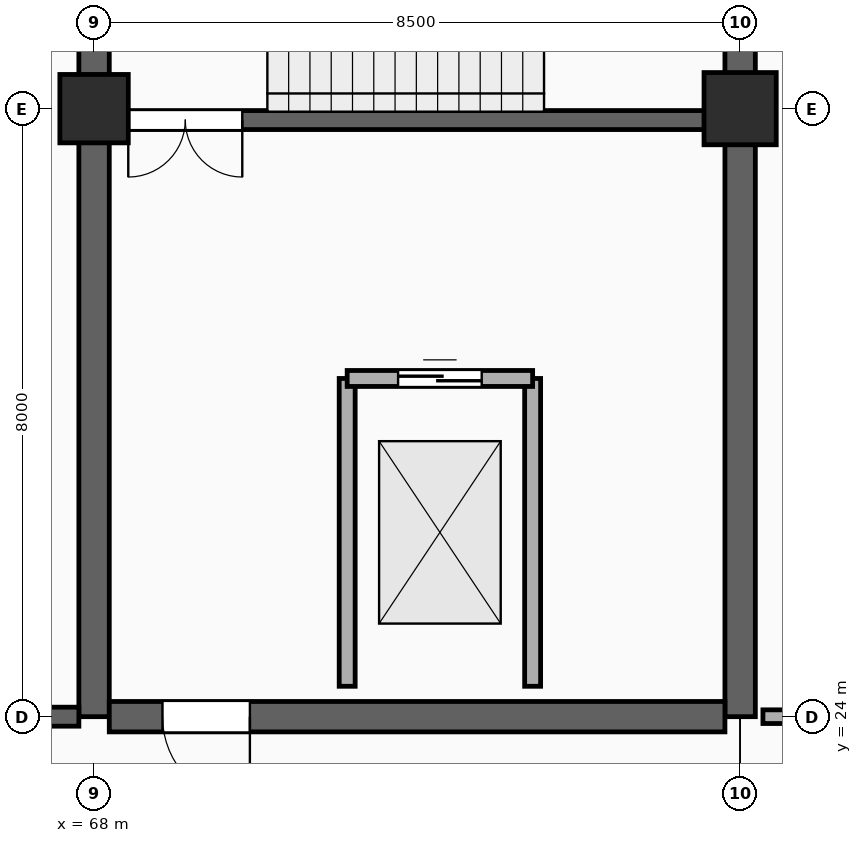
"""IFC4 building model, lengths in metres.
Left out: names, types, materials, properties, quantities, classifications, styles, units other than length and angle.
Written with IfcOpenShell. Run it as: python <this file> out.ifc"""

import sys

from ifc_helpers import new_model, si_unit, direction, frame, frame_2d, origin, origin_2d, place, context, subcontext, project, spatial, rectangle, extrude, element, fill, save


model = new_model("IFC4")
c1 = context("Model", 3, precision=1e-05, world=origin(), true_north=direction((0.0, 1.0)))
c2 = subcontext(c1, "Body", "Model", "MODEL_VIEW")
j1 = project(units=[si_unit("LENGTHUNIT", "METRE"), si_unit("PLANEANGLEUNIT", "RADIAN")], contexts=[c1])
p1 = place(None, origin())
s1 = spatial("IfcSite", under=j1, at=p1, CompositionType="ELEMENT")
p2 = place(p1, origin())
s2 = spatial("IfcBuilding", under=s1, at=p2, CompositionType="ELEMENT")
p3 = place(p2, frame((0.0, 0.0, -4.8)))
s3 = spatial("IfcBuildingStorey", under=s2, at=p3, CompositionType="ELEMENT", Elevation=-4.8)
for number, where, z_axis, x_axis in (
    (1, (68.0, 24.0, 0.0), (0.0, 0.0, 1.0), (0.0, 1.0, 0.0)),
    (2, (76.5, 24.0, 0.0), (0.0, 0.0, 1.0), (0.0, 1.0, 0.0)),
):
    element("IfcWall", number, at=place(p3, frame(where, z_axis=z_axis, x_axis=x_axis)), inside=s3, PredefinedType="SHEAR", context=c2, shape_type="SweptSolid", body=[
        extrude(rectangle(XDim=12.8, YDim=0.4, at=frame_2d((6.4, 0.0))), origin(), (0.0, 0.0, 1.0), 4.64),
    ])
p4 = place(p3, frame((68.2, 24.0, 0.0), z_axis=(0.0, 0.0, 1.0), x_axis=(1.0, 0.0, 0.0)))
e3 = element("IfcWall", 3, at=p4, inside=s3, PredefinedType="SHEAR", context=c2, shape_type="SweptSolid", body=[
    extrude(rectangle(XDim=8.1, YDim=0.4, at=frame_2d((4.05, 0.0))), origin(), (0.0, 0.0, 1.0), 4.64),
])
p5 = place(p4, frame((0.7, 0.0, 0.0)))
e4 = element("IfcOpeningElement", 4, at=p5, cuts=e3, PredefinedType="OPENING", context=c2, shape_type="SweptSolid", body=[
    extrude(rectangle(XDim=1.15, YDim=2.2, at=frame_2d((0.575, 1.1))), frame((0.0, 0.212, 0.0), z_axis=(0.0, -1.0, 0.0), x_axis=(1.0, 0.0, 0.0)), (0.0, 0.0, 1.0), 0.424),
])
p6 = place(p3, frame((68.25, 31.85, 0.0), z_axis=(0.0, 0.0, 1.0), x_axis=(1.0, 0.0, 0.0)))
e5 = element("IfcWall", 5, at=p6, inside=s3, PredefinedType="STANDARD", context=c2, shape_type="SweptSolid", body=[
    extrude(rectangle(XDim=8.0, YDim=0.25, at=frame_2d((4.0, 0.0))), origin(), (0.0, 0.0, 1.0), 4.64),
])
p7 = place(p6, frame((0.2, 0.0, 0.0)))
e6 = element("IfcOpeningElement", 6, at=p7, cuts=e5, PredefinedType="OPENING", context=c2, shape_type="SweptSolid", body=[
    extrude(rectangle(XDim=1.5, YDim=2.2, at=frame_2d((0.75, 1.1))), frame((0.0, 0.137, 0.0), z_axis=(0.0, -1.0, 0.0), x_axis=(1.0, 0.0, 0.0)), (0.0, 0.0, 1.0), 0.274),
])
for number, where, z_axis, x_axis in (
    (7, (71.33, 24.4, 0.0), (0.0, 0.0, 1.0), (0.0, 1.0, 0.0)),
    (8, (73.77, 24.4, 0.0), (0.0, 0.0, 1.0), (0.0, 1.0, 0.0)),
):
    element("IfcWall", number, at=place(p3, frame(where, z_axis=z_axis, x_axis=x_axis)), inside=s3, PredefinedType="PARTITIONING", context=c2, shape_type="SweptSolid", body=[
        extrude(rectangle(XDim=4.05, YDim=0.21, at=frame_2d((2.025, 0.0))), origin(), (0.0, 0.0, 1.0), 4.64),
    ])
p8 = place(p3, frame((71.33, 28.45, 0.0), z_axis=(0.0, 0.0, 1.0), x_axis=(1.0, 0.0, 0.0)))
e9 = element("IfcWall", 9, at=p8, inside=s3, PredefinedType="PARTITIONING", context=c2, shape_type="SweptSolid", body=[
    extrude(rectangle(XDim=2.44, YDim=0.21, at=frame_2d((1.22, 0.0))), origin(), (0.0, 0.0, 1.0), 4.64),
])
p9 = place(p8, frame((0.67, 0.0, 0.0)))
e10 = element("IfcOpeningElement", 10, at=p9, cuts=e9, PredefinedType="OPENING", context=c2, shape_type="SweptSolid", body=[
    extrude(rectangle(XDim=1.1, YDim=2.2, at=frame_2d((0.55, 1.1))), frame((0.0, 0.117, 0.0), z_axis=(0.0, -1.0, 0.0), x_axis=(1.0, 0.0, 0.0)), (0.0, 0.0, 1.0), 0.234),
])
p10 = place(p3, frame((68.0, 32.0, 0.0), z_axis=(0.0, 0.0, 1.0), x_axis=(1.0, 0.0, 0.0)))
e11 = element("IfcColumn", 11, at=p10, inside=s3, PredefinedType="COLUMN", context=c2, shape_type="SweptSolid", body=[
    extrude(rectangle(XDim=0.9, YDim=0.9, at=origin_2d()), origin(), (0.0, 0.0, 1.0), 4.46),
])
p11 = place(p3, frame((76.5, 32.0, 0.0), z_axis=(0.0, 0.0, 1.0), x_axis=(1.0, 0.0, 0.0)))
e12 = element("IfcColumn", 12, at=p11, inside=s3, PredefinedType="COLUMN", context=c2, shape_type="SweptSolid", body=[
    extrude(rectangle(XDim=0.95, YDim=0.95, at=origin_2d()), origin(), (0.0, 0.0, 1.0), 4.46),
])
p12 = place(p3, frame((42.7, 24.0, 0.0), z_axis=(0.0, 0.0, 1.0), x_axis=(1.0, 0.0, 0.0)))
e13 = element("IfcWall", 13, at=p12, inside=s3, PredefinedType="STANDARD", context=c2, shape_type="SweptSolid", body=[
    extrude(rectangle(XDim=25.1, YDim=0.25, at=frame_2d((12.55, 0.0))), origin(), (0.0, 0.0, 1.0), 4.5),
])
p13 = place(p12, frame((5.5, 0.0, 0.0)))
e14 = element("IfcOpeningElement", 14, at=p13, cuts=e13, PredefinedType="OPENING", context=c2, shape_type="SweptSolid", body=[
    extrude(rectangle(XDim=1.4, YDim=2.3, at=frame_2d((0.7, 1.15))), frame((0.0, 0.137, 0.0), z_axis=(0.0, -1.0, 0.0), x_axis=(1.0, 0.0, 0.0)), (0.0, 0.0, 1.0), 0.274),
])
p14 = place(p3, frame((76.8, 24.0, 0.0), z_axis=(0.0, 0.0, 1.0), x_axis=(1.0, 0.0, 0.0)))
e15 = element("IfcWall", 15, at=p14, inside=s3, PredefinedType="PARTITIONING", context=c2, shape_type="SweptSolid", body=[
    extrude(rectangle(XDim=50.4, YDim=0.18, at=frame_2d((25.2, 0.0))), origin(), (0.0, 0.0, 1.0), 3.56),
])
p15 = place(p14, frame((8.0, 0.0, 0.0)))
e16 = element("IfcOpeningElement", 16, at=p15, cuts=e15, PredefinedType="OPENING", context=c2, shape_type="SweptSolid", body=[
    extrude(rectangle(XDim=0.9, YDim=2.1, at=frame_2d((0.45, 1.05))), frame((0.0, 0.102, 0.0), z_axis=(0.0, -1.0, 0.0), x_axis=(1.0, 0.0, 0.0)), (0.0, 0.0, 1.0), 0.204),
])
p16 = place(p14, frame((34.0, 0.0, 0.0)))
e17 = element("IfcOpeningElement", 17, at=p16, cuts=e15, PredefinedType="OPENING", context=c2, shape_type="SweptSolid", body=[
    extrude(rectangle(XDim=0.9, YDim=2.1, at=frame_2d((0.45, 1.05))), frame((0.0, 0.102, 0.0), z_axis=(0.0, -1.0, 0.0), x_axis=(1.0, 0.0, 0.0)), (0.0, 0.0, 1.0), 0.204),
])
p17 = place(p7, frame((1.5, 0.0, 0.0), z_axis=(0.0, 0.0, 1.0), x_axis=(-1.0, 0.0, 0.0)))
e18 = element("IfcDoor", 18, at=p17, inside=s3, OperationType="DOUBLE_DOOR_SINGLE_SWING", PredefinedType="DOOR", context=c2, shape_type="SweptSolid", body=[
    extrude(rectangle(XDim=1.5, YDim=2.2, at=frame_2d((0.75, 1.1))), frame((0.0, 0.025, 0.0), z_axis=(0.0, -1.0, 0.0), x_axis=(1.0, 0.0, 0.0)), (0.0, 0.0, 1.0), 0.05),
])
fill(e6, e18)
p18 = place(p9, origin())
e19 = element("IfcDoor", 19, at=p18, inside=s3, OperationType="DOUBLE_DOOR_SLIDING", PredefinedType="DOOR", context=c2, shape_type="SweptSolid", body=[
    extrude(rectangle(XDim=1.1, YDim=2.2, at=frame_2d((0.55, 1.1))), frame((0.0, 0.025, 0.0), z_axis=(0.0, -1.0, 0.0), x_axis=(1.0, 0.0, 0.0)), (0.0, 0.0, 1.0), 0.05),
])
fill(e10, e19)
p19 = place(p5, frame((1.15, 0.0, 0.0), z_axis=(0.0, 0.0, 1.0), x_axis=(-1.0, 0.0, 0.0)))
e20 = element("IfcDoor", 20, at=p19, inside=s3, OperationType="SINGLE_SWING_RIGHT", PredefinedType="DOOR", context=c2, shape_type="SweptSolid", body=[
    extrude(rectangle(XDim=1.15, YDim=2.2, at=frame_2d((0.575, 1.1))), frame((0.0, 0.025, 0.0), z_axis=(0.0, -1.0, 0.0), x_axis=(1.0, 0.0, 0.0)), (0.0, 0.0, 1.0), 0.05),
])
fill(e4, e20)
save(model, sys.argv[1])
